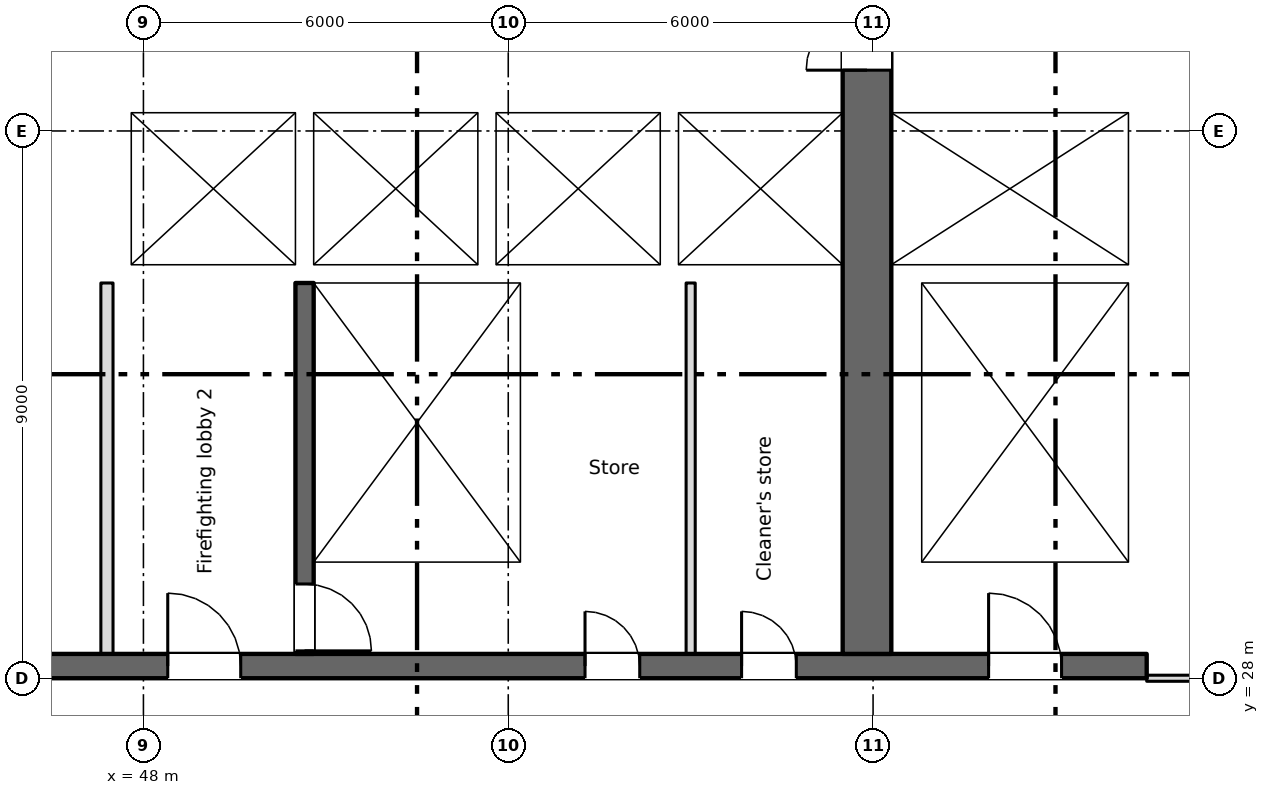
"""IFC4 building model, lengths in metres.
Left out: names, types, materials, properties, quantities, classifications, styles, units other than length and angle.
Written with IfcOpenShell. Run it as: python <this file> out.ifc"""

import sys

from ifc_helpers import new_model, si_unit, direction, frame, frame_2d, origin, place, context, subcontext, project, spatial, rectangle, extrude, element, fill, save


model = new_model("IFC4")
c1 = context("Model", 3, precision=1e-05, world=origin(), true_north=direction((0.0, 1.0)))
c2 = subcontext(c1, "Body", "Model", "MODEL_VIEW")
j1 = project(units=[si_unit("LENGTHUNIT", "METRE"), si_unit("PLANEANGLEUNIT", "RADIAN")], contexts=[c1])
p1 = place(None, origin())
s1 = spatial("IfcSite", under=j1, at=p1, CompositionType="ELEMENT")
p2 = place(p1, origin())
s2 = spatial("IfcBuilding", under=s1, at=p2, CompositionType="ELEMENT")
p3 = place(p2, frame((0.0, 0.0, 143.75)))
s3 = spatial("IfcBuildingStorey", under=s2, at=p3, CompositionType="ELEMENT", Elevation=143.75)
p4 = place(p3, frame((6.7, 28.2, 0.0), z_axis=(0.0, 0.0, 1.0), x_axis=(1.0, 0.0, 0.0)))
e1 = element("IfcWall", 1, at=p4, inside=s3, PredefinedType="SHEAR", context=c2, shape_type="SweptSolid", body=[
    extrude(rectangle(XDim=57.8, YDim=0.4, at=frame_2d((28.9, 0.0))), origin(), (0.0, 0.0, 1.0), 3.35),
])
p5 = place(p4, frame((13.85, 0.0, 0.0)))
e2 = element("IfcOpeningElement", 2, at=p5, cuts=e1, PredefinedType="OPENING", context=c2, shape_type="SweptSolid", body=[
    extrude(rectangle(XDim=0.9, YDim=2.1, at=frame_2d((0.45, 1.05))), frame((0.0, 0.21, 0.0), z_axis=(0.0, -1.0, 0.0), x_axis=(1.0, 0.0, 0.0)), (0.0, 0.0, 1.0), 0.42),
])
p6 = place(p4, frame((48.562, 0.0, 0.0)))
e3 = element("IfcOpeningElement", 3, at=p6, cuts=e1, PredefinedType="OPENING", context=c2, shape_type="SweptSolid", body=[
    extrude(rectangle(XDim=0.9, YDim=2.1, at=frame_2d((0.45, 1.05))), frame((0.0, 0.21, 0.0), z_axis=(0.0, -1.0, 0.0), x_axis=(1.0, 0.0, 0.0)), (0.0, 0.0, 1.0), 0.42),
])
p7 = place(p4, frame((51.137, 0.0, 0.0)))
e4 = element("IfcOpeningElement", 4, at=p7, cuts=e1, PredefinedType="OPENING", context=c2, shape_type="SweptSolid", body=[
    extrude(rectangle(XDim=0.9, YDim=2.1, at=frame_2d((0.45, 1.05))), frame((0.0, 0.21, 0.0), z_axis=(0.0, -1.0, 0.0), x_axis=(1.0, 0.0, 0.0)), (0.0, 0.0, 1.0), 0.42),
])
p8 = place(p4, frame((1.35, 0.0, 0.0)))
e5 = element("IfcOpeningElement", 5, at=p8, cuts=e1, PredefinedType="OPENING", context=c2, shape_type="SweptSolid", body=[
    extrude(rectangle(XDim=0.9, YDim=2.1, at=frame_2d((0.45, 1.05))), frame((0.0, 0.21, 0.0), z_axis=(0.0, -1.0, 0.0), x_axis=(1.0, 0.0, 0.0)), (0.0, 0.0, 1.0), 0.42),
])
p9 = place(p4, frame((4.7, 0.0, 0.0)))
e6 = element("IfcOpeningElement", 6, at=p9, cuts=e1, PredefinedType="OPENING", context=c2, shape_type="SweptSolid", body=[
    extrude(rectangle(XDim=1.2, YDim=2.1, at=frame_2d((0.6, 1.05))), frame((0.0, 0.21, 0.0), z_axis=(0.0, -1.0, 0.0), x_axis=(1.0, 0.0, 0.0)), (0.0, 0.0, 1.0), 0.42),
])
p10 = place(p4, frame((31.7, 0.0, 0.0)))
e7 = element("IfcOpeningElement", 7, at=p10, cuts=e1, PredefinedType="OPENING", context=c2, shape_type="SweptSolid", body=[
    extrude(rectangle(XDim=1.2, YDim=2.1, at=frame_2d((0.6, 1.05))), frame((0.0, 0.21, 0.0), z_axis=(0.0, -1.0, 0.0), x_axis=(1.0, 0.0, 0.0)), (0.0, 0.0, 1.0), 0.42),
])
p11 = place(p4, frame((55.2, 0.0, 0.0)))
e8 = element("IfcOpeningElement", 8, at=p11, cuts=e1, PredefinedType="OPENING", context=c2, shape_type="SweptSolid", body=[
    extrude(rectangle(XDim=1.2, YDim=2.1, at=frame_2d((0.6, 1.05))), frame((0.0, 0.21, 0.0), z_axis=(0.0, -1.0, 0.0), x_axis=(1.0, 0.0, 0.0)), (0.0, 0.0, 1.0), 0.42),
])
p12 = place(p4, frame((21.7, 0.0, 0.0)))
e9 = element("IfcOpeningElement", 9, at=p12, cuts=e1, PredefinedType="OPENING", context=c2, shape_type="SweptSolid", body=[
    extrude(rectangle(XDim=1.2, YDim=2.1, at=frame_2d((0.6, 1.05))), frame((0.0, 0.21, 0.0), z_axis=(0.0, -1.0, 0.0), x_axis=(1.0, 0.0, 0.0)), (0.0, 0.0, 1.0), 0.42),
])
p13 = place(p4, frame((41.7, 0.0, 0.0)))
e10 = element("IfcOpeningElement", 10, at=p13, cuts=e1, PredefinedType="OPENING", context=c2, shape_type="SweptSolid", body=[
    extrude(rectangle(XDim=1.2, YDim=2.1, at=frame_2d((0.6, 1.05))), frame((0.0, 0.21, 0.0), z_axis=(0.0, -1.0, 0.0), x_axis=(1.0, 0.0, 0.0)), (0.0, 0.0, 1.0), 0.42),
])
p14 = place(p4, frame((24.85, 0.0, 0.0)))
e11 = element("IfcOpeningElement", 11, at=p14, cuts=e1, PredefinedType="OPENING", context=c2, shape_type="SweptSolid", body=[
    extrude(rectangle(XDim=2.4, YDim=2.1, at=frame_2d((1.2, 1.05))), frame((0.0, 0.21, 0.0), z_axis=(0.0, -1.0, 0.0), x_axis=(1.0, 0.0, 0.0)), (0.0, 0.0, 1.0), 0.42),
])
p15 = place(p4, frame((37.35, 0.0, 0.0)))
e12 = element("IfcOpeningElement", 12, at=p15, cuts=e1, PredefinedType="OPENING", context=c2, shape_type="SweptSolid", body=[
    extrude(rectangle(XDim=2.4, YDim=2.1, at=frame_2d((1.2, 1.05))), frame((0.0, 0.21, 0.0), z_axis=(0.0, -1.0, 0.0), x_axis=(1.0, 0.0, 0.0)), (0.0, 0.0, 1.0), 0.42),
])
p16 = place(p4, frame((7.95, 0.0, 0.0)))
e13 = element("IfcOpeningElement", 13, at=p16, cuts=e1, PredefinedType="OPENING", context=c2, shape_type="SweptSolid", body=[
    extrude(rectangle(XDim=2.4, YDim=2.1, at=frame_2d((1.2, 1.05))), frame((0.0, 0.21, 0.0), z_axis=(0.0, -1.0, 0.0), x_axis=(1.0, 0.0, 0.0)), (0.0, 0.0, 1.0), 0.42),
])
p17 = place(p4, frame((28.85, 0.0, 0.0)))
e14 = element("IfcOpeningElement", 14, at=p17, cuts=e1, PredefinedType="OPENING", context=c2, shape_type="SweptSolid", body=[
    extrude(rectangle(XDim=0.9, YDim=2.1, at=frame_2d((0.45, 1.05))), frame((0.0, 0.21, 0.0), z_axis=(0.0, -1.0, 0.0), x_axis=(1.0, 0.0, 0.0)), (0.0, 0.0, 1.0), 0.42),
])
p18 = place(p4, frame((34.85, 0.0, 0.0)))
e15 = element("IfcOpeningElement", 15, at=p18, cuts=e1, PredefinedType="OPENING", context=c2, shape_type="SweptSolid", body=[
    extrude(rectangle(XDim=0.9, YDim=2.1, at=frame_2d((0.45, 1.05))), frame((0.0, 0.21, 0.0), z_axis=(0.0, -1.0, 0.0), x_axis=(1.0, 0.0, 0.0)), (0.0, 0.0, 1.0), 0.42),
])
p19 = place(p3, frame((64.35, 34.8, 0.0), z_axis=(0.0, 0.0, 1.0), x_axis=(0.0, 1.0, 0.0)))
e16 = element("IfcWall", 16, at=p19, inside=s3, PredefinedType="SHEAR", context=c2, shape_type="SweptSolid", body=[
    extrude(rectangle(XDim=10.4, YDim=0.3, at=frame_2d((5.2, 0.0))), origin(), (0.0, 0.0, 1.0), 3.35),
])
p20 = place(p3, frame((59.9, 28.4, 0.0), z_axis=(0.0, 0.0, 1.0), x_axis=(0.0, 1.0, 0.0)))
e17 = element("IfcWall", 17, at=p20, inside=s3, PredefinedType="SHEAR", context=c2, shape_type="SweptSolid", body=[
    extrude(rectangle(XDim=16.8, YDim=0.8, at=frame_2d((8.4, 0.0))), origin(), (0.0, 0.0, 1.0), 3.35),
])
p21 = place(p20, frame((9.6, 0.0, 0.0)))
e18 = element("IfcOpeningElement", 18, at=p21, cuts=e17, PredefinedType="OPENING", context=c2, shape_type="SweptSolid", body=[
    extrude(rectangle(XDim=2.0, YDim=2.1, at=frame_2d((1.0, 1.05))), frame((0.0, 0.41, 0.0), z_axis=(0.0, -1.0, 0.0), x_axis=(1.0, 0.0, 0.0)), (0.0, 0.0, 1.0), 0.82),
])
p22 = place(p20, frame((15.35, 0.0, 0.0)))
e19 = element("IfcOpeningElement", 19, at=p22, cuts=e17, PredefinedType="OPENING", context=c2, shape_type="SweptSolid", body=[
    extrude(rectangle(XDim=1.2, YDim=2.1, at=frame_2d((0.6, 1.05))), frame((0.0, 0.41, 0.0), z_axis=(0.0, -1.0, 0.0), x_axis=(1.0, 0.0, 0.0)), (0.0, 0.0, 1.0), 0.82),
])
p23 = place(p3, frame((50.65, 34.5, 0.0), z_axis=(0.0, 0.0, 1.0), x_axis=(0.0, -1.0, 0.0)))
e20 = element("IfcWall", 20, at=p23, inside=s3, PredefinedType="SHEAR", context=c2, shape_type="SweptSolid", body=[
    extrude(rectangle(XDim=6.1, YDim=0.3, at=frame_2d((3.05, 0.0))), origin(), (0.0, 0.0, 1.0), 3.35),
])
p24 = place(p23, frame((4.95, 0.0, 0.0)))
e21 = element("IfcOpeningElement", 21, at=p24, cuts=e20, PredefinedType="OPENING", context=c2, shape_type="SweptSolid", body=[
    extrude(rectangle(XDim=1.1, YDim=2.1, at=frame_2d((0.55, 1.05))), frame((0.0, 0.16, 0.0), z_axis=(0.0, -1.0, 0.0), x_axis=(1.0, 0.0, 0.0)), (0.0, 0.0, 1.0), 0.32),
])
p25 = place(p3, frame((54.35, 28.4, 0.0), z_axis=(0.0, 0.0, 1.0), x_axis=(0.0, 1.0, 0.0)))
e22 = element("IfcWall", 22, at=p25, inside=s3, PredefinedType="SHEAR", context=c2, shape_type="SweptSolid", body=[
    extrude(rectangle(XDim=6.1, YDim=0.3, at=frame_2d((3.05, 0.0))), origin(), (0.0, 0.0, 1.0), 3.35),
])
p26 = place(p3, frame((60.55, 28.4, 0.0), z_axis=(0.0, 0.0, 1.0), x_axis=(0.0, 1.0, 0.0)))
e23 = element("IfcWall", 23, at=p26, inside=s3, PredefinedType="SHEAR", context=c2, shape_type="SweptSolid", body=[
    extrude(rectangle(XDim=6.1, YDim=0.5, at=frame_2d((3.05, 0.0))), origin(), (0.0, 0.0, 1.0), 3.35),
])
p27 = place(p3, frame((64.35, 28.4, 0.0), z_axis=(0.0, 0.0, 1.0), x_axis=(0.0, 1.0, 0.0)))
e24 = element("IfcWall", 24, at=p27, inside=s3, PredefinedType="SHEAR", context=c2, shape_type="SweptSolid", body=[
    extrude(rectangle(XDim=6.1, YDim=0.3, at=frame_2d((3.05, 0.0))), origin(), (0.0, 0.0, 1.0), 3.35),
])
p28 = place(p3, frame((47.3, 34.65, 0.0), z_axis=(0.0, 0.0, 1.0), x_axis=(1.0, 0.0, 0.0)))
e25 = element("IfcWall", 25, at=p28, inside=s3, PredefinedType="SHEAR", context=c2, shape_type="SweptSolid", body=[
    extrude(rectangle(XDim=12.2, YDim=0.3, at=frame_2d((6.1, 0.0))), origin(), (0.0, 0.0, 1.0), 3.35),
])
p29 = place(p28, frame((1.3, 0.0, 0.0)))
e26 = element("IfcOpeningElement", 26, at=p29, cuts=e25, PredefinedType="OPENING", context=c2, shape_type="SweptSolid", body=[
    extrude(rectangle(XDim=1.1, YDim=2.1, at=frame_2d((0.55, 1.05))), frame((0.0, 0.16, 0.0), z_axis=(0.0, -1.0, 0.0), x_axis=(1.0, 0.0, 0.0)), (0.0, 0.0, 1.0), 0.32),
])
p30 = place(p3, frame((60.3, 34.65, 0.0), z_axis=(0.0, 0.0, 1.0), x_axis=(1.0, 0.0, 0.0)))
e27 = element("IfcWall", 27, at=p30, inside=s3, PredefinedType="SHEAR", context=c2, shape_type="SweptSolid", body=[
    extrude(rectangle(XDim=4.2, YDim=0.3, at=frame_2d((2.1, 0.0))), origin(), (0.0, 0.0, 1.0), 3.35),
])
p31 = place(p3, frame((47.3, 37.45, 0.0), z_axis=(0.0, 0.0, 1.0), x_axis=(1.0, 0.0, 0.0)))
e28 = element("IfcWall", 28, at=p31, inside=s3, PredefinedType="SHEAR", context=c2, shape_type="SweptSolid", body=[
    extrude(rectangle(XDim=12.2, YDim=0.3, at=frame_2d((6.1, 0.0))), origin(), (0.0, 0.0, 1.0), 3.35),
])
p32 = place(p31, frame((4.3, 0.0, 0.0)))
e29 = element("IfcOpeningElement", 29, at=p32, cuts=e28, PredefinedType="OPENING", context=c2, shape_type="SweptSolid", body=[
    extrude(rectangle(XDim=1.1, YDim=2.1, at=frame_2d((0.55, 1.05))), frame((0.0, 0.16, 0.0), z_axis=(0.0, -1.0, 0.0), x_axis=(1.0, 0.0, 0.0)), (0.0, 0.0, 1.0), 0.32),
])
p33 = place(p31, frame((7.3, 0.0, 0.0)))
e30 = element("IfcOpeningElement", 30, at=p33, cuts=e28, PredefinedType="OPENING", context=c2, shape_type="SweptSolid", body=[
    extrude(rectangle(XDim=1.1, YDim=2.1, at=frame_2d((0.55, 1.05))), frame((0.0, 0.16, 0.0), z_axis=(0.0, -1.0, 0.0), x_axis=(1.0, 0.0, 0.0)), (0.0, 0.0, 1.0), 0.32),
])
p34 = place(p31, frame((10.3, 0.0, 0.0)))
e31 = element("IfcOpeningElement", 31, at=p34, cuts=e28, PredefinedType="OPENING", context=c2, shape_type="SweptSolid", body=[
    extrude(rectangle(XDim=1.1, YDim=2.1, at=frame_2d((0.55, 1.05))), frame((0.0, 0.16, 0.0), z_axis=(0.0, -1.0, 0.0), x_axis=(1.0, 0.0, 0.0)), (0.0, 0.0, 1.0), 0.32),
])
p35 = place(p3, frame((60.3, 37.45, 0.0), z_axis=(0.0, 0.0, 1.0), x_axis=(1.0, 0.0, 0.0)))
e32 = element("IfcWall", 32, at=p35, inside=s3, PredefinedType="SHEAR", context=c2, shape_type="SweptSolid", body=[
    extrude(rectangle(XDim=3.9, YDim=0.3, at=frame_2d((1.95, 0.0))), origin(), (0.0, 0.0, 1.0), 3.35),
])
p36 = place(p35, frame((1.4, 0.0, 0.0)))
e33 = element("IfcOpeningElement", 33, at=p36, cuts=e32, PredefinedType="OPENING", context=c2, shape_type="SweptSolid", body=[
    extrude(rectangle(XDim=1.1, YDim=2.1, at=frame_2d((0.55, 1.05))), frame((0.0, 0.16, 0.0), z_axis=(0.0, -1.0, 0.0), x_axis=(1.0, 0.0, 0.0)), (0.0, 0.0, 1.0), 0.32),
])
p37 = place(p3, frame((47.55, 34.8, 0.0), z_axis=(0.0, 0.0, 1.0), x_axis=(0.0, 1.0, 0.0)))
e34 = element("IfcWall", 34, at=p37, inside=s3, PredefinedType="SHEAR", context=c2, shape_type="SweptSolid", body=[
    extrude(rectangle(XDim=2.5, YDim=0.5, at=frame_2d((1.25, 0.0))), origin(), (0.0, 0.0, 1.0), 3.35),
])
for number, where, z_axis, x_axis in (
    (35, (50.65, 34.8, 0.0), (0.0, 0.0, 1.0), (0.0, 1.0, 0.0)),
    (36, (53.65, 34.8, 0.0), (0.0, 0.0, 1.0), (0.0, 1.0, 0.0)),
    (37, (56.65, 34.8, 0.0), (0.0, 0.0, 1.0), (0.0, 1.0, 0.0)),
):
    element("IfcWall", number, at=place(p3, frame(where, z_axis=z_axis, x_axis=x_axis)), inside=s3, PredefinedType="SHEAR", context=c2, shape_type="SweptSolid", body=[
        extrude(rectangle(XDim=2.5, YDim=0.3, at=frame_2d((1.25, 0.0))), origin(), (0.0, 0.0, 1.0), 3.35),
    ])
p38 = place(p3, frame((47.4, 28.4, 0.0), z_axis=(0.0, 0.0, 1.0), x_axis=(0.0, 1.0, 0.0)))
e38 = element("IfcWall", 38, at=p38, inside=s3, PredefinedType="PARTITIONING", context=c2, shape_type="SweptSolid", body=[
    extrude(rectangle(XDim=6.1, YDim=0.2, at=frame_2d((3.05, 0.0))), origin(), (0.0, 0.0, 1.0), 3.35),
])
p39 = place(p3, frame((57.0, 28.4, 0.0), z_axis=(0.0, 0.0, 1.0), x_axis=(0.0, 1.0, 0.0)))
e39 = element("IfcWall", 39, at=p39, inside=s3, PredefinedType="PARTITIONING", context=c2, shape_type="SweptSolid", body=[
    extrude(rectangle(XDim=6.1, YDim=0.15, at=frame_2d((3.05, 0.0))), origin(), (0.0, 0.0, 1.0), 3.35),
])
p40 = place(p3, frame((64.5, 28.0, 0.0), z_axis=(0.0, 0.0, 1.0), x_axis=(1.0, 0.0, 0.0)))
e40 = element("IfcWall", 40, at=p40, inside=s3, PredefinedType="PARTITIONING", context=c2, shape_type="SweptSolid", body=[
    extrude(rectangle(XDim=6.8, YDim=0.1, at=frame_2d((3.4, 0.0))), origin(), (0.0, 0.0, 1.0), 3.35),
])
p41 = place(p40, frame((2.5, 0.0, 0.0)))
e41 = element("IfcOpeningElement", 41, at=p41, cuts=e40, PredefinedType="OPENING", context=c2, shape_type="SweptSolid", body=[
    extrude(rectangle(XDim=1.8, YDim=2.1, at=frame_2d((0.9, 1.05))), frame((0.0, 0.06, 0.0), z_axis=(0.0, -1.0, 0.0), x_axis=(1.0, 0.0, 0.0)), (0.0, 0.0, 1.0), 0.12),
])
p42 = place(p6, origin())
e42 = element("IfcDoor", 42, at=p42, inside=s3, OperationType="SINGLE_SWING_LEFT", PredefinedType="DOOR", context=c2, shape_type="SweptSolid", body=[
    extrude(rectangle(XDim=0.9, YDim=2.1, at=frame_2d((0.45, 1.05))), frame((0.0, 0.025, 0.0), z_axis=(0.0, -1.0, 0.0), x_axis=(1.0, 0.0, 0.0)), (0.0, 0.0, 1.0), 0.05),
])
fill(e3, e42)
p43 = place(p7, origin())
e43 = element("IfcDoor", 43, at=p43, inside=s3, OperationType="SINGLE_SWING_LEFT", PredefinedType="DOOR", context=c2, shape_type="SweptSolid", body=[
    extrude(rectangle(XDim=0.9, YDim=2.1, at=frame_2d((0.45, 1.05))), frame((0.0, 0.025, 0.0), z_axis=(0.0, -1.0, 0.0), x_axis=(1.0, 0.0, 0.0)), (0.0, 0.0, 1.0), 0.05),
])
fill(e4, e43)
p44 = place(p32, origin())
e44 = element("IfcDoor", 44, at=p44, inside=s3, OperationType="SLIDING_TO_LEFT", PredefinedType="DOOR", context=c2, shape_type="SweptSolid", body=[
    extrude(rectangle(XDim=1.1, YDim=2.1, at=frame_2d((0.55, 1.05))), frame((0.0, 0.025, 0.0), z_axis=(0.0, -1.0, 0.0), x_axis=(1.0, 0.0, 0.0)), (0.0, 0.0, 1.0), 0.05),
])
fill(e29, e44)
p45 = place(p33, origin())
e45 = element("IfcDoor", 45, at=p45, inside=s3, OperationType="SLIDING_TO_LEFT", PredefinedType="DOOR", context=c2, shape_type="SweptSolid", body=[
    extrude(rectangle(XDim=1.1, YDim=2.1, at=frame_2d((0.55, 1.05))), frame((0.0, 0.025, 0.0), z_axis=(0.0, -1.0, 0.0), x_axis=(1.0, 0.0, 0.0)), (0.0, 0.0, 1.0), 0.05),
])
fill(e30, e45)
p46 = place(p34, origin())
e46 = element("IfcDoor", 46, at=p46, inside=s3, OperationType="SLIDING_TO_LEFT", PredefinedType="DOOR", context=c2, shape_type="SweptSolid", body=[
    extrude(rectangle(XDim=1.1, YDim=2.1, at=frame_2d((0.55, 1.05))), frame((0.0, 0.025, 0.0), z_axis=(0.0, -1.0, 0.0), x_axis=(1.0, 0.0, 0.0)), (0.0, 0.0, 1.0), 0.05),
])
fill(e31, e46)
p47 = place(p36, origin())
e47 = element("IfcDoor", 47, at=p47, inside=s3, OperationType="SLIDING_TO_LEFT", PredefinedType="DOOR", context=c2, shape_type="SweptSolid", body=[
    extrude(rectangle(XDim=1.1, YDim=2.1, at=frame_2d((0.55, 1.05))), frame((0.0, 0.025, 0.0), z_axis=(0.0, -1.0, 0.0), x_axis=(1.0, 0.0, 0.0)), (0.0, 0.0, 1.0), 0.05),
])
fill(e33, e47)
p48 = place(p29, origin())
e48 = element("IfcDoor", 48, at=p48, inside=s3, OperationType="SLIDING_TO_LEFT", PredefinedType="DOOR", context=c2, shape_type="SweptSolid", body=[
    extrude(rectangle(XDim=1.1, YDim=2.1, at=frame_2d((0.55, 1.05))), frame((0.0, 0.025, 0.0), z_axis=(0.0, -1.0, 0.0), x_axis=(1.0, 0.0, 0.0)), (0.0, 0.0, 1.0), 0.05),
])
fill(e26, e48)
p49 = place(p24, origin())
e49 = element("IfcDoor", 49, at=p49, inside=s3, OperationType="SINGLE_SWING_RIGHT", PredefinedType="DOOR", context=c2, shape_type="SweptSolid", body=[
    extrude(rectangle(XDim=1.1, YDim=2.1, at=frame_2d((0.55, 1.05))), frame((0.0, 0.025, 0.0), z_axis=(0.0, -1.0, 0.0), x_axis=(1.0, 0.0, 0.0)), (0.0, 0.0, 1.0), 0.05),
])
fill(e21, e49)
p50 = place(p11, origin())
e50 = element("IfcDoor", 50, at=p50, inside=s3, OperationType="SINGLE_SWING_LEFT", PredefinedType="DOOR", context=c2, shape_type="SweptSolid", body=[
    extrude(rectangle(XDim=1.2, YDim=2.1, at=frame_2d((0.6, 1.05))), frame((0.0, 0.025, 0.0), z_axis=(0.0, -1.0, 0.0), x_axis=(1.0, 0.0, 0.0)), (0.0, 0.0, 1.0), 0.05),
])
fill(e8, e50)
p51 = place(p13, origin())
e51 = element("IfcDoor", 51, at=p51, inside=s3, OperationType="SINGLE_SWING_LEFT", PredefinedType="DOOR", context=c2, shape_type="SweptSolid", body=[
    extrude(rectangle(XDim=1.2, YDim=2.1, at=frame_2d((0.6, 1.05))), frame((0.0, 0.025, 0.0), z_axis=(0.0, -1.0, 0.0), x_axis=(1.0, 0.0, 0.0)), (0.0, 0.0, 1.0), 0.05),
])
fill(e10, e51)
p52 = place(p21, origin())
e52 = element("IfcDoor", 52, at=p52, inside=s3, OperationType="DOUBLE_DOOR_SINGLE_SWING", PredefinedType="DOOR", context=c2, shape_type="SweptSolid", body=[
    extrude(rectangle(XDim=2.0, YDim=2.1, at=frame_2d((1.0, 1.05))), frame((0.0, 0.025, 0.0), z_axis=(0.0, -1.0, 0.0), x_axis=(1.0, 0.0, 0.0)), (0.0, 0.0, 1.0), 0.05),
])
fill(e18, e52)
save(model, sys.argv[1])
